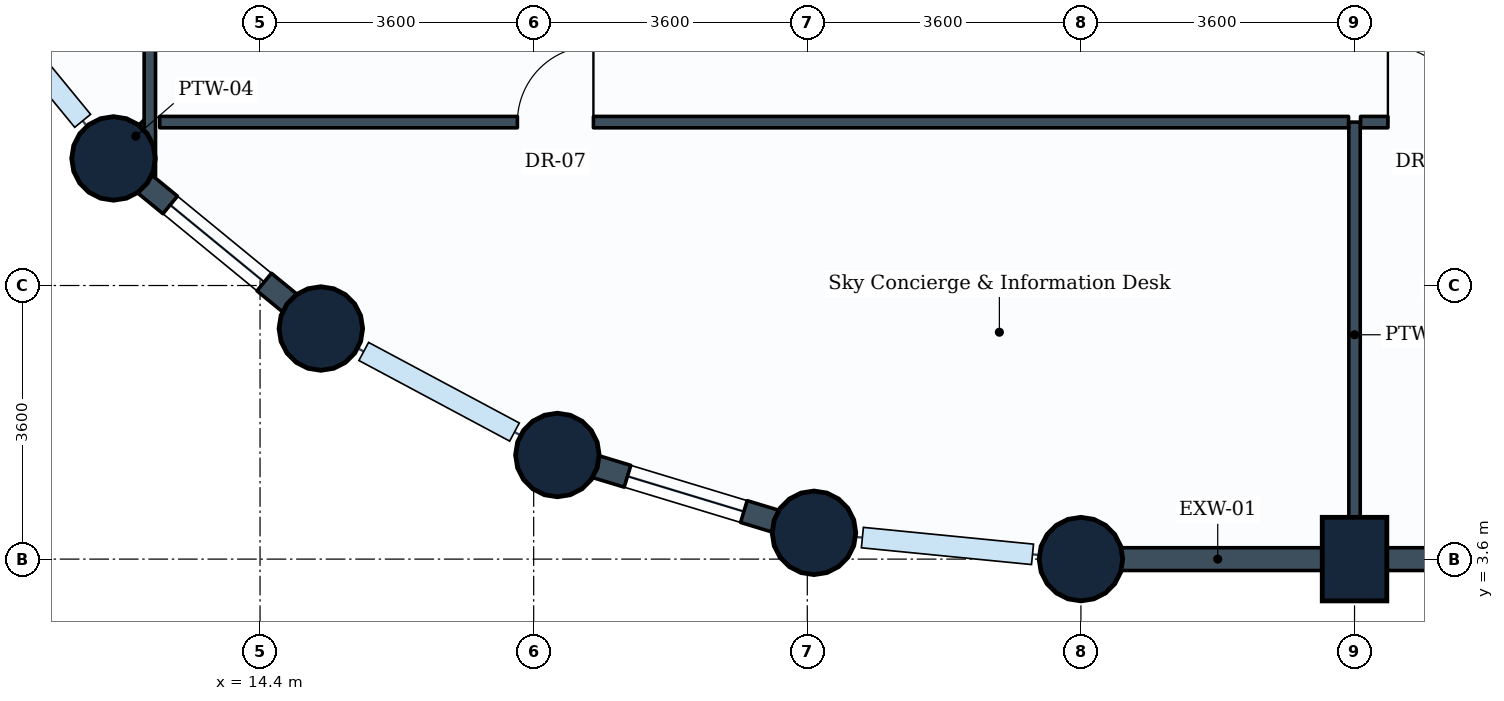
"""IFC4 building model, lengths in metres.
Left out: names, types, materials, properties, quantities, classifications, styles, units other than length and angle.
Written with IfcOpenShell. Run it as: python <this file> out.ifc"""

import sys

from ifc_helpers import new_model, si_unit, direction, frame, frame_2d, origin, origin_2d, place, context, subcontext, project, spatial, rectangle, circle, extrude, element, fill, save


model = new_model("IFC4")
c1 = context("Model", 3, precision=1e-05, world=origin(), true_north=direction((0.0, 1.0)))
c2 = subcontext(c1, "Body", "Model", "MODEL_VIEW")
j1 = project(units=[si_unit("LENGTHUNIT", "METRE"), si_unit("PLANEANGLEUNIT", "RADIAN")], contexts=[c1])
p1 = place(None, origin())
s1 = spatial("IfcSite", under=j1, at=p1, CompositionType="ELEMENT")
p2 = place(p1, origin())
s2 = spatial("IfcBuilding", under=s1, at=p2, CompositionType="ELEMENT")
p3 = place(p2, frame((0.0, 0.0, 115.2)))
s3 = spatial("IfcBuildingStorey", under=s2, at=p3, CompositionType="ELEMENT", Elevation=115.2)
for number, where, z_axis, x_axis in (
    (1, (12.472, 8.872, 0.0), (0.0, 0.0, 1.0), (1.0, 0.0, 0.0)),
    (2, (15.2, 6.634, 0.0), (0.0, 0.0, 1.0), (1.0, 0.0, 0.0)),
    (3, (18.312, 4.97, 0.0), (0.0, 0.0, 1.0), (1.0, 0.0, 0.0)),
    (4, (21.688, 3.946, 0.0), (0.0, 0.0, 1.0), (1.0, 0.0, 0.0)),
    (5, (25.2, 3.6, 0.0), (0.0, 0.0, 1.0), (1.0, 0.0, 0.0)),
):
    element("IfcColumn", number, at=place(p3, frame(where, z_axis=z_axis, x_axis=x_axis)), inside=s3, PredefinedType="COLUMN", context=c2, shape_type="SweptSolid", body=[
        extrude(circle(Radius=0.55, at=origin_2d()), origin(), (0.0, 0.0, 1.0), 4.8),
    ])
p4 = place(p3, frame((28.8, 3.6, 0.0), z_axis=(0.0, 0.0, 1.0), x_axis=(1.0, 0.0, 0.0)))
e6 = element("IfcColumn", 6, at=p4, inside=s3, PredefinedType="COLUMN", context=c2, shape_type="SweptSolid", body=[
    extrude(rectangle(XDim=0.85, YDim=1.1, at=origin_2d()), origin(), (0.0, 0.0, 1.0), 4.8),
])
p5 = place(p3, frame((28.8, 3.6, 0.0), z_axis=(0.0, 0.0, 1.0), x_axis=(-1.0, 0.0, 0.0)))
e7 = element("IfcWall", 7, at=p5, inside=s3, PredefinedType="STANDARD", context=c2, shape_type="SweptSolid", body=[
    extrude(rectangle(XDim=3.6, YDim=0.3, at=frame_2d((1.8, 0.0))), origin(), (0.0, 0.0, 1.0), 3.93),
])
p6 = place(p3, frame((32.4, 3.6, 0.0), z_axis=(0.0, 0.0, 1.0), x_axis=(-1.0, 0.0, 0.0)))
e8 = element("IfcWall", 8, at=p6, inside=s3, PredefinedType="STANDARD", context=c2, shape_type="SweptSolid", body=[
    extrude(rectangle(XDim=3.6, YDim=0.3, at=frame_2d((1.8, 0.0))), origin(), (0.0, 0.0, 1.0), 3.93),
])
p7 = place(p3, frame((15.2, 6.634, 0.0), z_axis=(0.0, 0.0, 1.0), x_axis=(-0.773121216285, 0.634258295121, 0.0)))
e9 = element("IfcWall", 9, at=p7, inside=s3, PredefinedType="STANDARD", context=c2, shape_type="SweptSolid", body=[
    extrude(rectangle(XDim=3.529, YDim=0.3, at=frame_2d((1.764, 0.0))), origin(), (0.0, 0.0, 1.0), 3.93),
])
p8 = place(p7, frame((0.964, 0.0, 0.85)))
e10 = element("IfcOpeningElement", 10, at=p8, cuts=e9, PredefinedType="OPENING", context=c2, shape_type="SweptSolid", body=[
    extrude(rectangle(XDim=1.6, YDim=1.35, at=frame_2d((0.8, 0.675))), frame((0.0, 0.16, 0.0), z_axis=(0.0, -1.0, 0.0), x_axis=(1.0, 0.0, 0.0)), (0.0, 0.0, 1.0), 0.32),
])
p9 = place(p3, frame((21.688, 3.946, 0.0), z_axis=(0.0, 0.0, 1.0), x_axis=(-0.956953367403, 0.290241714123, 0.0)))
e11 = element("IfcWall", 11, at=p9, inside=s3, PredefinedType="STANDARD", context=c2, shape_type="SweptSolid", body=[
    extrude(rectangle(XDim=3.528, YDim=0.3, at=frame_2d((1.764, 0.0))), origin(), (0.0, 0.0, 1.0), 3.93),
])
p10 = place(p9, frame((0.964, 0.0, 0.85)))
e12 = element("IfcOpeningElement", 12, at=p10, cuts=e11, PredefinedType="OPENING", context=c2, shape_type="SweptSolid", body=[
    extrude(rectangle(XDim=1.6, YDim=1.35, at=frame_2d((0.8, 0.675))), frame((0.0, 0.16, 0.0), z_axis=(0.0, -1.0, 0.0), x_axis=(1.0, 0.0, 0.0)), (0.0, 0.0, 1.0), 0.32),
])
p11 = place(p3, frame((28.8, 9.35, 0.0), z_axis=(0.0, 0.0, 1.0), x_axis=(0.0, -1.0, 0.0)))
e13 = element("IfcWall", 13, at=p11, inside=s3, PredefinedType="PARTITIONING", context=c2, shape_type="SweptSolid", body=[
    extrude(rectangle(XDim=5.596, YDim=0.15, at=frame_2d((2.798, 0.0))), origin(), (0.0, 0.0, 1.0), 4.535),
])
p12 = place(p3, frame((12.95, 9.35, 0.0), z_axis=(0.0, 0.0, 1.0), x_axis=(-0.707106781187, -0.707106781187, 0.0)))
e14 = element("IfcWall", 14, at=p12, inside=s3, PredefinedType="PARTITIONING", context=c2, shape_type="SweptSolid", body=[
    extrude(rectangle(XDim=0.522, YDim=0.15, at=frame_2d((0.261, 0.0))), origin(), (0.0, 0.0, 1.0), 4.09),
])
p13 = place(p3, frame((12.95, 8.634, 0.0), z_axis=(0.0, 0.0, 1.0), x_axis=(0.0, 1.0, 0.0)))
e15 = element("IfcWall", 15, at=p13, inside=s3, PredefinedType="PARTITIONING", context=c2, shape_type="SweptSolid", body=[
    extrude(rectangle(XDim=16.487, YDim=0.15, at=frame_2d((8.244, 0.0))), origin(), (0.0, 0.0, 1.0), 3.93),
])
p14 = place(p13, frame((7.706, 0.0, 0.0)))
e16 = element("IfcOpeningElement", 16, at=p14, cuts=e15, PredefinedType="OPENING", context=c2, shape_type="SweptSolid", body=[
    extrude(rectangle(XDim=1.0, YDim=2.1, at=frame_2d((0.5, 1.05))), frame((0.0, 0.085, 0.0), z_axis=(0.0, -1.0, 0.0), x_axis=(1.0, 0.0, 0.0)), (0.0, 0.0, 1.0), 0.17),
])
p15 = place(p3, frame((13.08, 9.35, 0.0), z_axis=(0.0, 0.0, 1.0), x_axis=(1.0, 0.0, 0.0)))
e17 = element("IfcWall", 17, at=p15, inside=s3, PredefinedType="PARTITIONING", context=c2, shape_type="SweptSolid", body=[
    extrude(rectangle(XDim=15.641, YDim=0.15, at=frame_2d((7.82, 0.0))), origin(), (0.0, 0.0, 1.0), 4.08),
])
p16 = place(p15, frame((4.706, 0.0, 0.0)))
e18 = element("IfcOpeningElement", 18, at=p16, cuts=e17, PredefinedType="OPENING", context=c2, shape_type="SweptSolid", body=[
    extrude(rectangle(XDim=1.0, YDim=2.1, at=frame_2d((0.5, 1.05))), frame((0.0, 0.085, 0.0), z_axis=(0.0, -1.0, 0.0), x_axis=(1.0, 0.0, 0.0)), (0.0, 0.0, 1.0), 0.17),
])
p17 = place(p3, frame((28.879, 9.35, 0.0), z_axis=(0.0, 0.0, 1.0), x_axis=(1.0, 0.0, 0.0)))
e19 = element("IfcWall", 19, at=p17, inside=s3, PredefinedType="PARTITIONING", context=c2, shape_type="SweptSolid", body=[
    extrude(rectangle(XDim=5.521, YDim=0.15, at=frame_2d((2.76, 0.0))), origin(), (0.0, 0.0, 1.0), 4.535),
])
p18 = place(p17, frame((0.36, 0.0, 0.0)))
e20 = element("IfcOpeningElement", 20, at=p18, cuts=e19, PredefinedType="OPENING", context=c2, shape_type="SweptSolid", body=[
    extrude(rectangle(XDim=1.0, YDim=2.1, at=frame_2d((0.5, 1.05))), frame((0.0, 0.085, 0.0), z_axis=(0.0, -1.0, 0.0), x_axis=(1.0, 0.0, 0.0)), (0.0, 0.0, 1.0), 0.17),
])
p19 = place(p8, origin())
e21 = element("IfcWindow", 21, at=p19, inside=s3, PartitioningType="SINGLE_PANEL", PredefinedType="WINDOW", context=c2, shape_type="SweptSolid", body=[
    extrude(rectangle(XDim=1.6, YDim=1.35, at=frame_2d((0.8, 0.675))), frame((0.0, 0.03, 0.0), z_axis=(0.0, -1.0, 0.0), x_axis=(1.0, 0.0, 0.0)), (0.0, 0.0, 1.0), 0.06),
])
fill(e10, e21)
p20 = place(p10, origin())
e22 = element("IfcWindow", 22, at=p20, inside=s3, PartitioningType="SINGLE_PANEL", PredefinedType="WINDOW", context=c2, shape_type="SweptSolid", body=[
    extrude(rectangle(XDim=1.6, YDim=1.35, at=frame_2d((0.8, 0.675))), frame((0.0, 0.03, 0.0), z_axis=(0.0, -1.0, 0.0), x_axis=(1.0, 0.0, 0.0)), (0.0, 0.0, 1.0), 0.06),
])
fill(e12, e22)
p21 = place(p16, origin())
e23 = element("IfcDoor", 23, at=p21, inside=s3, OperationType="SINGLE_SWING_RIGHT", PredefinedType="DOOR", context=c2, shape_type="SweptSolid", body=[
    extrude(rectangle(XDim=1.0, YDim=2.1, at=frame_2d((0.5, 1.05))), frame((0.0, 0.025, 0.0), z_axis=(0.0, -1.0, 0.0), x_axis=(1.0, 0.0, 0.0)), (0.0, 0.0, 1.0), 0.05),
])
fill(e18, e23)
p22 = place(p18, origin())
e24 = element("IfcDoor", 24, at=p22, inside=s3, OperationType="SINGLE_SWING_LEFT", PredefinedType="DOOR", context=c2, shape_type="SweptSolid", body=[
    extrude(rectangle(XDim=1.0, YDim=2.1, at=frame_2d((0.5, 1.05))), frame((0.0, 0.025, 0.0), z_axis=(0.0, -1.0, 0.0), x_axis=(1.0, 0.0, 0.0)), (0.0, 0.0, 1.0), 0.05),
])
fill(e20, e24)
save(model, sys.argv[1])
